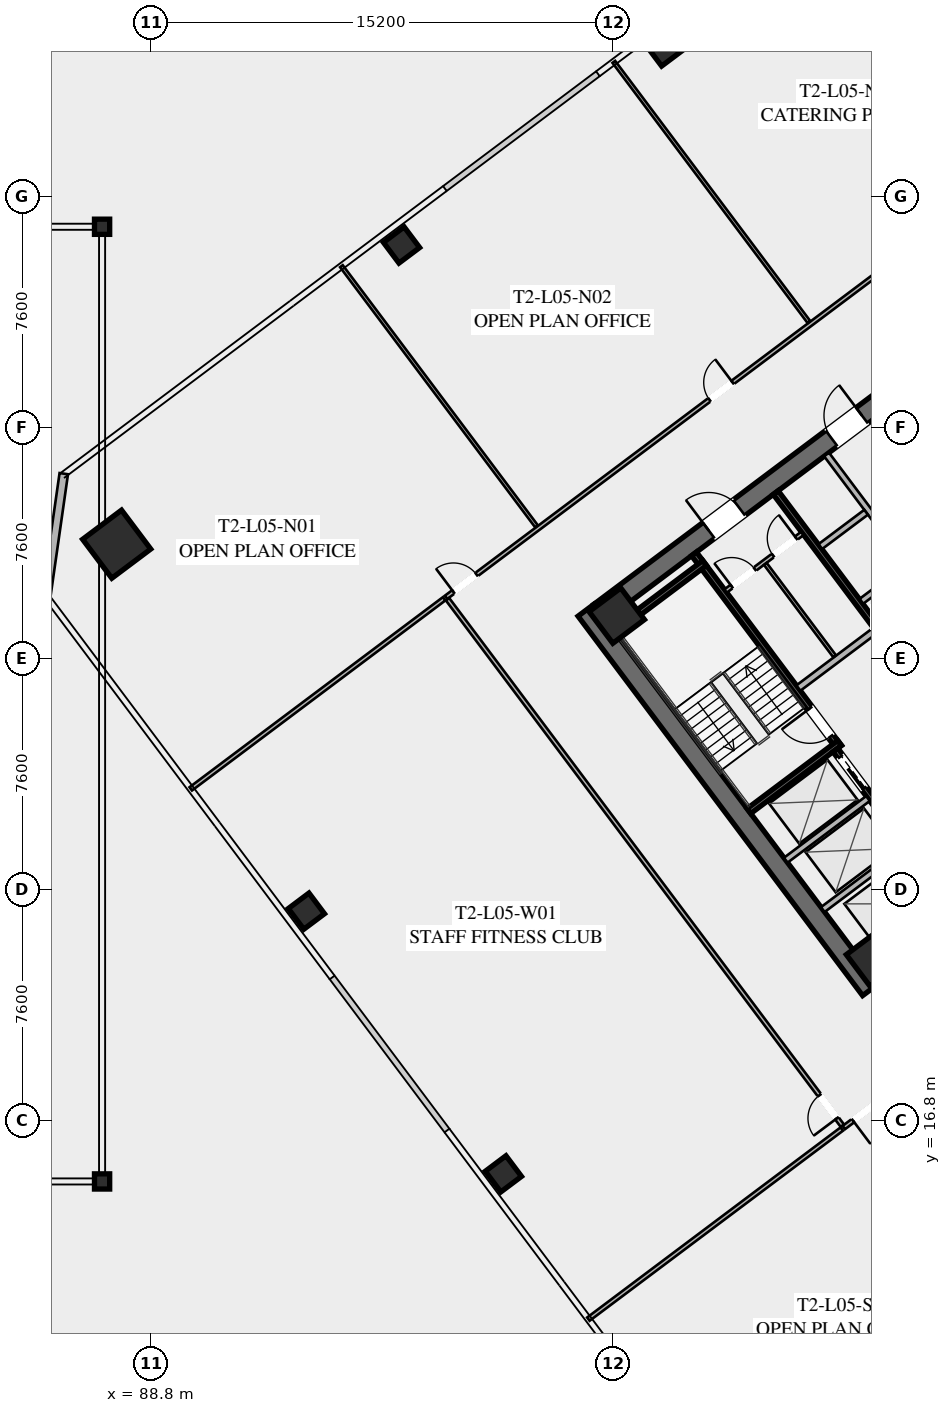
"""IFC4 building model, lengths in metres.
Left out: names, types, materials, properties, quantities, classifications, styles, units other than length and angle.
Written with IfcOpenShell. Run it as: python <this file> out.ifc"""

import sys

from ifc_helpers import new_model, si_unit, direction, frame, frame_2d, origin, origin_2d, place, context, subcontext, project, spatial, rectangle, hollow_rectangle, extrude, element, fill, save


model = new_model("IFC4")
c1 = context("Model", 3, precision=1e-05, world=origin(), true_north=direction((0.0, 1.0)))
c2 = subcontext(c1, "Body", "Model", "MODEL_VIEW")
j1 = project(units=[si_unit("LENGTHUNIT", "METRE"), si_unit("PLANEANGLEUNIT", "RADIAN")], contexts=[c1])
p1 = place(None, origin())
s1 = spatial("IfcSite", under=j1, at=p1, CompositionType="ELEMENT")
p2 = place(p1, origin())
s2 = spatial("IfcBuilding", under=s1, at=p2, CompositionType="ELEMENT")
p3 = place(p2, frame((0.0, 0.0, 24.6)))
s3 = spatial("IfcBuildingStorey", under=s2, at=p3, CompositionType="ELEMENT", Elevation=24.6)
for number, where, z_axis, x_axis in (
    (1, (87.2, 14.8, 0.0), (0.0, 0.0, 1.0), (1.0, 0.0, 0.0)),
    (2, (87.2, 46.2, 0.0), (0.0, 0.0, 1.0), (1.0, 0.0, 0.0)),
):
    element("IfcColumn", number, at=place(p3, frame(where, z_axis=z_axis, x_axis=x_axis)), inside=s3, PredefinedType="COLUMN", context=c2, shape_type="SweptSolid", body=[
        extrude(hollow_rectangle(XDim=0.5, YDim=0.5, WallThickness=0.02, at=origin_2d()), origin(), (0.0, 0.0, 1.0), 5.2),
    ])
p4 = place(p3, frame((112.476, 21.107, 0.0), z_axis=(0.0, 0.0, 1.0), x_axis=(-0.600005007985, 0.799996243986, 0.0)))
e3 = element("IfcWall", 3, at=p4, inside=s3, PredefinedType="SHEAR", context=c2, shape_type="SweptSolid", body=[
    extrude(rectangle(XDim=15.6, YDim=0.65, at=frame_2d((7.8, 0.0))), origin(), (0.0, 0.0, 1.0), 3.55),
])
p5 = place(p3, frame((124.429, 30.478, 0.0), z_axis=(0.0, 0.0, 1.0), x_axis=(-0.799998028465, -0.600002628705, 0.0)))
e4 = element("IfcWall", 4, at=p5, inside=s3, PredefinedType="SHEAR", context=c2, shape_type="SweptSolid", body=[
    extrude(rectangle(XDim=14.86, YDim=0.65, at=frame_2d((7.43, 0.0))), origin(), (0.0, 0.0, 1.0), 3.55),
])
p6 = place(p5, frame((9.13, 0.0, 0.0)))
e5 = element("IfcOpeningElement", 5, at=p6, cuts=e4, PredefinedType="OPENING", context=c2, shape_type="SweptSolid", body=[
    extrude(rectangle(XDim=1.25, YDim=2.25, at=frame_2d((0.625, 1.125))), frame((0.0, 0.335, 0.0), z_axis=(0.0, -1.0, 0.0), x_axis=(1.0, 0.0, 0.0)), (0.0, 0.0, 1.0), 0.67),
])
p7 = place(p5, frame((4.08, 0.0, 0.0)))
e6 = element("IfcOpeningElement", 6, at=p7, cuts=e4, PredefinedType="OPENING", context=c2, shape_type="SweptSolid", body=[
    extrude(rectangle(XDim=1.25, YDim=2.25, at=frame_2d((0.625, 1.125))), frame((0.0, 0.335, 0.0), z_axis=(0.0, -1.0, 0.0), x_axis=(1.0, 0.0, 0.0)), (0.0, 0.0, 1.0), 0.67),
])
p8 = place(p3, frame((103.571, 33.522, 0.0), z_axis=(0.0, 0.0, 1.0), x_axis=(0.799998028465, 0.600002628705, 0.0)))
e7 = element("IfcWall", 7, at=p8, inside=s3, PredefinedType="SHEAR", context=c2, shape_type="SweptSolid", body=[
    extrude(rectangle(XDim=14.86, YDim=0.65, at=frame_2d((7.43, 0.0))), origin(), (0.0, 0.0, 1.0), 3.55),
])
p9 = place(p8, frame((4.48, 0.0, 0.0)))
e8 = element("IfcOpeningElement", 8, at=p9, cuts=e7, PredefinedType="OPENING", context=c2, shape_type="SweptSolid", body=[
    extrude(rectangle(XDim=1.25, YDim=2.25, at=frame_2d((0.625, 1.125))), frame((0.0, 0.335, 0.0), z_axis=(0.0, -1.0, 0.0), x_axis=(1.0, 0.0, 0.0)), (0.0, 0.0, 1.0), 0.67),
])
p10 = place(p8, frame((9.53, 0.0, 0.0)))
e9 = element("IfcOpeningElement", 9, at=p10, cuts=e7, PredefinedType="OPENING", context=c2, shape_type="SweptSolid", body=[
    extrude(rectangle(XDim=1.25, YDim=2.25, at=frame_2d((0.625, 1.125))), frame((0.0, 0.335, 0.0), z_axis=(0.0, -1.0, 0.0), x_axis=(1.0, 0.0, 0.0)), (0.0, 0.0, 1.0), 0.67),
])
for number, where, z_axis, x_axis in (
    (10, (112.59, 22.13, 0.0), (0.0, 0.0, 1.0), (0.8, 0.6, 0.0)),
    (11, (104.13, 33.41, 0.0), (0.0, 0.0, 1.0), (0.8, 0.6, 0.0)),
):
    element("IfcColumn", number, at=place(p3, frame(where, z_axis=z_axis, x_axis=x_axis)), inside=s3, PredefinedType="COLUMN", context=c2, shape_type="SweptSolid", body=[
        extrude(hollow_rectangle(XDim=1.3, YDim=1.3, WallThickness=0.05, at=origin_2d()), origin(), (0.0, 0.0, 1.0), 3.35),
    ])
p11 = place(p3, frame((87.68, 35.76, 0.0), z_axis=(0.0, 0.0, 1.0), x_axis=(0.799999996291, 0.600000004945, 0.0)))
e12 = element("IfcColumn", 12, at=p11, inside=s3, PredefinedType="COLUMN", context=c2, shape_type="SweptSolid", body=[
    extrude(hollow_rectangle(XDim=1.6, YDim=1.6, WallThickness=0.06, at=origin_2d()), origin(), (0.0, 0.0, 1.0), 3.35),
])
for number, where, z_axis, x_axis in (
    (13, (105.69, 52.08, 0.0), (0.0, 0.0, 1.0), (0.8, 0.6, 0.0)),
    (14, (97.05, 45.6, 0.0), (0.0, 0.0, 1.0), (0.8, 0.6, 0.0)),
    (15, (93.92, 23.69, 0.0), (0.0, 0.0, 1.0), (0.8, 0.6, 0.0)),
    (16, (100.4, 15.05, 0.0), (0.0, 0.0, 1.0), (0.8, 0.6, 0.0)),
):
    element("IfcColumn", number, at=place(p3, frame(where, z_axis=z_axis, x_axis=x_axis)), inside=s3, PredefinedType="COLUMN", context=c2, shape_type="SweptSolid", body=[
        extrude(hollow_rectangle(XDim=0.85, YDim=0.85, WallThickness=0.035, at=origin_2d()), origin(), (0.0, 0.0, 1.0), 3.35),
    ])
p12 = place(p3, frame((85.36, 34.02, 0.0), z_axis=(0.0, 0.0, 1.0), x_axis=(0.14137968631, 0.989955445613, 0.0)))
e17 = element("IfcWall", 17, at=p12, inside=s3, PredefinedType="SOLIDWALL", context=c2, shape_type="SweptSolid", body=[
    extrude(rectangle(XDim=4.101, YDim=0.28, at=frame_2d((2.051, 0.0))), origin(), (0.0, 0.0, 1.0), 3.35),
])
p13 = place(p3, frame((111.44, 29.08, 0.0), z_axis=(0.0, 0.0, 1.0), x_axis=(-0.600009827119, 0.799992629566, 0.0)))
e18 = element("IfcWall", 18, at=p13, inside=s3, PredefinedType="SHEAR", context=c2, shape_type="SweptSolid", body=[
    extrude(rectangle(XDim=7.95, YDim=0.2, at=frame_2d((3.975, 0.0))), origin(), (0.0, 0.0, 1.0), 3.35),
])
p14 = place(p13, frame((0.45, 0.0, 0.0)))
e19 = element("IfcOpeningElement", 19, at=p14, cuts=e18, PredefinedType="OPENING", context=c2, shape_type="SweptSolid", body=[
    extrude(rectangle(XDim=1.15, YDim=2.2, at=frame_2d((0.575, 1.1))), frame((0.0, 0.11, 0.0), z_axis=(0.0, -1.0, 0.0), x_axis=(1.0, 0.0, 0.0)), (0.0, 0.0, 1.0), 0.22),
])
for number, where, z_axis, x_axis in (
    (20, (108.476, 26.982, 0.0), (0.0, 0.0, 1.0), (0.8, 0.6, 0.0)),
    (21, (104.036, 32.902, 0.0), (0.0, 0.0, 1.0), (0.8, 0.6, 0.0)),
):
    element("IfcWall", number, at=place(p3, frame(where, z_axis=z_axis, x_axis=x_axis)), inside=s3, PredefinedType="SHEAR", context=c2, shape_type="SweptSolid", body=[
        extrude(rectangle(XDim=3.73, YDim=0.2, at=frame_2d((1.865, 0.0))), origin(), (0.0, 0.0, 1.0), 3.35),
    ])
p15 = place(p3, frame((117.938, 26.016, 0.0), z_axis=(0.0, 0.0, 1.0), x_axis=(-0.600005463273, 0.799995902516, 0.0)))
e22 = element("IfcWall", 22, at=p15, inside=s3, PredefinedType="SHEAR", context=c2, shape_type="SweptSolid", body=[
    extrude(rectangle(XDim=14.3, YDim=0.2, at=frame_2d((7.15, 0.0))), origin(), (0.0, 0.0, 1.0), 3.35),
])
p16 = place(p3, frame((110.104, 31.028, 0.0), z_axis=(0.0, 0.0, 1.0), x_axis=(0.800018601094, 0.59997519774, 0.0)))
e23 = element("IfcWall", 23, at=p16, inside=s3, PredefinedType="SOLIDWALL", context=c2, shape_type="SweptSolid", body=[
    extrude(rectangle(XDim=3.15, YDim=0.22, at=frame_2d((1.575, 0.0))), origin(), (0.0, 0.0, 1.0), 2.703),
])
p17 = place(p3, frame((115.13, 23.91, 0.0), z_axis=(0.0, 0.0, 1.0), x_axis=(-0.599975393228, 0.800018454488, 0.0)))
e24 = element("IfcWall", 24, at=p17, inside=s3, PredefinedType="SHEAR", context=c2, shape_type="SweptSolid", body=[
    extrude(rectangle(XDim=6.35, YDim=0.2, at=frame_2d((3.175, 0.0))), origin(), (0.0, 0.0, 1.0), 3.35),
])
p18 = place(p17, frame((4.775, 0.0, 0.0)))
e25 = element("IfcOpeningElement", 25, at=p18, cuts=e24, PredefinedType="OPENING", context=c2, shape_type="SweptSolid", body=[
    extrude(rectangle(XDim=1.3, YDim=2.25, at=frame_2d((0.65, 1.125))), frame((0.0, 0.11, 0.0), z_axis=(0.0, -1.0, 0.0), x_axis=(1.0, 0.0, 0.0)), (0.0, 0.0, 1.0), 0.22),
])
p19 = place(p17, frame((2.775, 0.0, 0.0)))
e26 = element("IfcOpeningElement", 26, at=p19, cuts=e24, PredefinedType="OPENING", context=c2, shape_type="SweptSolid", body=[
    extrude(rectangle(XDim=1.3, YDim=2.25, at=frame_2d((0.65, 1.125))), frame((0.0, 0.11, 0.0), z_axis=(0.0, -1.0, 0.0), x_axis=(1.0, 0.0, 0.0)), (0.0, 0.0, 1.0), 0.22),
])
p20 = place(p17, frame((0.575, 0.0, 0.0)))
e27 = element("IfcOpeningElement", 27, at=p20, cuts=e24, PredefinedType="OPENING", context=c2, shape_type="SweptSolid", body=[
    extrude(rectangle(XDim=1.3, YDim=2.25, at=frame_2d((0.65, 1.125))), frame((0.0, 0.11, 0.0), z_axis=(0.0, -1.0, 0.0), x_axis=(1.0, 0.0, 0.0)), (0.0, 0.0, 1.0), 0.22),
])
for number, where, z_axis, x_axis in (
    (28, (110.906, 23.742, 0.0), (0.0, 0.0, 1.0), (0.8, 0.6, 0.0)),
    (29, (109.688, 25.366, 0.0), (0.0, 0.0, 1.0), (0.8, 0.6, 0.0)),
):
    element("IfcWall", number, at=place(p3, frame(where, z_axis=z_axis, x_axis=x_axis)), inside=s3, PredefinedType="SOLIDWALL", context=c2, shape_type="SweptSolid", body=[
        extrude(rectangle(XDim=3.38, YDim=0.2, at=frame_2d((1.69, 0.0))), origin(), (0.0, 0.0, 1.0), 3.35),
    ])
p21 = place(p3, frame((107.71, 34.22, 0.0), z_axis=(0.0, 0.0, 1.0), x_axis=(0.799981399002, 0.60002480053, 0.0)))
e30 = element("IfcWall", 30, at=p21, inside=s3, PredefinedType="PARTITIONING", context=c2, shape_type="SweptSolid", body=[
    extrude(rectangle(XDim=3.15, YDim=0.135, at=frame_2d((1.575, 0.0))), origin(), (0.0, 0.0, 1.0), 2.703),
])
p22 = place(p21, frame((0.25, 0.0, 0.0)))
e31 = element("IfcOpeningElement", 31, at=p22, cuts=e30, PredefinedType="OPENING", context=c2, shape_type="SweptSolid", body=[
    extrude(rectangle(XDim=0.95, YDim=2.05, at=frame_2d((0.475, 1.025))), frame((0.0, 0.077, 0.0), z_axis=(0.0, -1.0, 0.0), x_axis=(1.0, 0.0, 0.0)), (0.0, 0.0, 1.0), 0.155),
])
p23 = place(p21, frame((1.95, 0.0, 0.0)))
e32 = element("IfcOpeningElement", 32, at=p23, cuts=e30, PredefinedType="OPENING", context=c2, shape_type="SweptSolid", body=[
    extrude(rectangle(XDim=0.95, YDim=2.05, at=frame_2d((0.475, 1.025))), frame((0.0, 0.077, 0.0), z_axis=(0.0, -1.0, 0.0), x_axis=(1.0, 0.0, 0.0)), (0.0, 0.0, 1.0), 0.155),
])
p24 = place(p3, frame((111.296, 32.072, 0.0), z_axis=(0.0, 0.0, 1.0), x_axis=(-0.59995887973, 0.800030838552, 0.0)))
e33 = element("IfcWall", 33, at=p24, inside=s3, PredefinedType="PARTITIONING", context=c2, shape_type="SweptSolid", body=[
    extrude(rectangle(XDim=3.8, YDim=0.11, at=frame_2d((1.9, 0.0))), origin(), (0.0, 0.0, 1.0), 2.703),
])
p25 = place(p3, frame((115.11, 33.27, 0.0), z_axis=(0.0, 0.0, 1.0), x_axis=(-0.600011488909, 0.79999138319, 0.0)))
e34 = element("IfcWall", 34, at=p25, inside=s3, PredefinedType="SOLIDWALL", context=c2, shape_type="SweptSolid", body=[
    extrude(rectangle(XDim=6.8, YDim=0.2, at=frame_2d((3.4, 0.0))), origin(), (0.0, 0.0, 1.0), 3.35),
])
p26 = place(p3, frame((112.176, 33.882, 0.0), z_axis=(0.0, 0.0, 1.0), x_axis=(0.8, 0.6, 0.0)))
e35 = element("IfcWall", 35, at=p26, inside=s3, PredefinedType="SOLIDWALL", context=c2, shape_type="SweptSolid", body=[
    extrude(rectangle(XDim=1.88, YDim=0.2, at=frame_2d((0.94, 0.0))), origin(), (0.0, 0.0, 1.0), 3.35),
])
p27 = place(p3, frame((110.826, 35.682, 0.0), z_axis=(0.0, 0.0, 1.0), x_axis=(0.799984418148, 0.600020775241, 0.0)))
e36 = element("IfcWall", 36, at=p27, inside=s3, PredefinedType="SOLIDWALL", context=c2, shape_type="SweptSolid", body=[
    extrude(rectangle(XDim=1.88, YDim=0.2, at=frame_2d((0.94, 0.0))), origin(), (0.0, 0.0, 1.0), 3.35),
])
p28 = place(p3, frame((98.516, 34.012, 0.0), z_axis=(0.0, 0.0, 1.0), x_axis=(0.799998035726, 0.600002619023, 0.0)))
e37 = element("IfcWall", 37, at=p28, inside=s3, PredefinedType="PARTITIONING", context=c2, shape_type="SweptSolid", body=[
    extrude(rectangle(XDim=29.83, YDim=0.135, at=frame_2d((14.915, 0.0))), origin(), (0.0, 0.0, 1.0), 2.703),
])
p29 = place(p28, frame((0.3, 0.0, 0.0)))
e38 = element("IfcOpeningElement", 38, at=p29, cuts=e37, PredefinedType="OPENING", context=c2, shape_type="SweptSolid", body=[
    extrude(rectangle(XDim=0.95, YDim=2.05, at=frame_2d((0.475, 1.025))), frame((0.0, 0.077, 0.0), z_axis=(0.0, -1.0, 0.0), x_axis=(1.0, 0.0, 0.0)), (0.0, 0.0, 1.0), 0.155),
])
p30 = place(p28, frame((10.829, 0.0, 0.0)))
e39 = element("IfcOpeningElement", 39, at=p30, cuts=e37, PredefinedType="OPENING", context=c2, shape_type="SweptSolid", body=[
    extrude(rectangle(XDim=0.95, YDim=2.05, at=frame_2d((0.475, 1.025))), frame((0.0, 0.077, 0.0), z_axis=(0.0, -1.0, 0.0), x_axis=(1.0, 0.0, 0.0)), (0.0, 0.0, 1.0), 0.155),
])
p31 = place(p28, frame((28.58, 0.0, 0.0)))
e40 = element("IfcOpeningElement", 40, at=p31, cuts=e37, PredefinedType="OPENING", context=c2, shape_type="SweptSolid", body=[
    extrude(rectangle(XDim=0.95, YDim=2.05, at=frame_2d((0.475, 1.025))), frame((0.0, 0.077, 0.0), z_axis=(0.0, -1.0, 0.0), x_axis=(1.0, 0.0, 0.0)), (0.0, 0.0, 1.0), 0.155),
])
for number, where, z_axis, x_axis in (
    (41, (101.492, 36.344, 0.0), (0.0, 0.0, 1.0), (-0.6, 0.8, 0.0)),
    (42, (110.452, 43.064, 0.0), (0.0, 0.0, 1.0), (-0.6, 0.8, 0.0)),
):
    element("IfcWall", number, at=place(p3, frame(where, z_axis=z_axis, x_axis=x_axis)), inside=s3, PredefinedType="PARTITIONING", context=c2, shape_type="SweptSolid", body=[
        extrude(rectangle(XDim=10.7, YDim=0.11, at=frame_2d((5.35, 0.0))), origin(), (0.0, 0.0, 1.0), 2.703),
    ])
p32 = place(p3, frame((135.46, 34.47, 0.0), z_axis=(0.0, 0.0, 1.0), x_axis=(-0.800000982127, -0.599998690494, 0.0)))
e43 = element("IfcWall", 43, at=p32, inside=s3, PredefinedType="PARTITIONING", context=c2, shape_type="SweptSolid", body=[
    extrude(rectangle(XDim=29.83, YDim=0.135, at=frame_2d((14.915, 0.0))), origin(), (0.0, 0.0, 1.0), 2.703),
])
p33 = place(p32, frame((28.5, 0.0, 0.0)))
e44 = element("IfcOpeningElement", 44, at=p33, cuts=e43, PredefinedType="OPENING", context=c2, shape_type="SweptSolid", body=[
    extrude(rectangle(XDim=0.95, YDim=2.05, at=frame_2d((0.475, 1.025))), frame((0.0, 0.077, 0.0), z_axis=(0.0, -1.0, 0.0), x_axis=(1.0, 0.0, 0.0)), (0.0, 0.0, 1.0), 0.155),
])
p34 = place(p32, frame((18.075, 0.0, 0.0)))
e45 = element("IfcOpeningElement", 45, at=p34, cuts=e43, PredefinedType="OPENING", context=c2, shape_type="SweptSolid", body=[
    extrude(rectangle(XDim=0.95, YDim=2.05, at=frame_2d((0.475, 1.025))), frame((0.0, 0.077, 0.0), z_axis=(0.0, -1.0, 0.0), x_axis=(1.0, 0.0, 0.0)), (0.0, 0.0, 1.0), 0.155),
])
p35 = place(p32, frame((0.38, 0.0, 0.0)))
e46 = element("IfcOpeningElement", 46, at=p35, cuts=e43, PredefinedType="OPENING", context=c2, shape_type="SweptSolid", body=[
    extrude(rectangle(XDim=0.95, YDim=2.05, at=frame_2d((0.475, 1.025))), frame((0.0, 0.077, 0.0), z_axis=(0.0, -1.0, 0.0), x_axis=(1.0, 0.0, 0.0)), (0.0, 0.0, 1.0), 0.155),
])
p36 = place(p3, frame((111.548, 16.636, 0.0), z_axis=(0.0, 0.0, 1.0), x_axis=(-0.600003610192, 0.799997292343, 0.0)))
e47 = element("IfcWall", 47, at=p36, inside=s3, PredefinedType="PARTITIONING", context=c2, shape_type="SweptSolid", body=[
    extrude(rectangle(XDim=21.64, YDim=0.135, at=frame_2d((10.82, 0.0))), origin(), (0.0, 0.0, 1.0), 2.703),
])
p37 = place(p36, frame((0.3, 0.0, 0.0)))
e48 = element("IfcOpeningElement", 48, at=p37, cuts=e47, PredefinedType="OPENING", context=c2, shape_type="SweptSolid", body=[
    extrude(rectangle(XDim=0.95, YDim=2.05, at=frame_2d((0.475, 1.025))), frame((0.0, 0.077, 0.0), z_axis=(0.0, -1.0, 0.0), x_axis=(1.0, 0.0, 0.0)), (0.0, 0.0, 1.0), 0.155),
])
p38 = place(p3, frame((98.452, 33.964, 0.0), z_axis=(0.0, 0.0, 1.0), x_axis=(-0.799988753532, -0.600014994998, 0.0)))
e49 = element("IfcWall", 49, at=p38, inside=s3, PredefinedType="PARTITIONING", context=c2, shape_type="SweptSolid", body=[
    extrude(rectangle(XDim=10.42, YDim=0.135, at=frame_2d((5.21, 0.0))), origin(), (0.0, 0.0, 1.0), 2.703),
])
p39 = place(p3, frame((103.196, 10.272, 0.0), z_axis=(0.0, 0.0, 1.0), x_axis=(0.8, 0.6, 0.0)))
e50 = element("IfcWall", 50, at=p39, inside=s3, PredefinedType="PARTITIONING", context=c2, shape_type="SweptSolid", body=[
    extrude(rectangle(XDim=10.42, YDim=0.135, at=frame_2d((5.21, 0.0))), origin(), (0.0, 0.0, 1.0), 2.703),
])
p40 = place(p9, origin())
e51 = element("IfcDoor", 51, at=p40, inside=s3, OperationType="SINGLE_SWING_LEFT", PredefinedType="DOOR", context=c2, shape_type="SweptSolid", body=[
    extrude(rectangle(XDim=1.25, YDim=2.25, at=frame_2d((0.625, 1.125))), frame((0.0, 0.025, 0.0), z_axis=(0.0, -1.0, 0.0), x_axis=(1.0, 0.0, 0.0)), (0.0, 0.0, 1.0), 0.05),
])
fill(e8, e51)
p41 = place(p10, origin())
e52 = element("IfcDoor", 52, at=p41, inside=s3, OperationType="SINGLE_SWING_RIGHT", PredefinedType="DOOR", context=c2, shape_type="SweptSolid", body=[
    extrude(rectangle(XDim=1.25, YDim=2.25, at=frame_2d((0.625, 1.125))), frame((0.0, 0.025, 0.0), z_axis=(0.0, -1.0, 0.0), x_axis=(1.0, 0.0, 0.0)), (0.0, 0.0, 1.0), 0.05),
])
fill(e9, e52)
p42 = place(p14, origin())
e53 = element("IfcDoor", 53, at=p42, inside=s3, OperationType="SINGLE_SWING_RIGHT", PredefinedType="DOOR", context=c2, shape_type="SweptSolid", body=[
    extrude(rectangle(XDim=1.15, YDim=2.2, at=frame_2d((0.575, 1.1))), frame((0.0, 0.025, 0.0), z_axis=(0.0, -1.0, 0.0), x_axis=(1.0, 0.0, 0.0)), (0.0, 0.0, 1.0), 0.05),
])
fill(e19, e53)
p43 = place(p22, origin())
e54 = element("IfcDoor", 54, at=p43, inside=s3, OperationType="SINGLE_SWING_LEFT", PredefinedType="DOOR", context=c2, shape_type="SweptSolid", body=[
    extrude(rectangle(XDim=0.95, YDim=2.05, at=frame_2d((0.475, 1.025))), frame((0.0, 0.025, 0.0), z_axis=(0.0, -1.0, 0.0), x_axis=(1.0, 0.0, 0.0)), (0.0, 0.0, 1.0), 0.05),
])
fill(e31, e54)
p44 = place(p23, origin())
e55 = element("IfcDoor", 55, at=p44, inside=s3, OperationType="SINGLE_SWING_RIGHT", PredefinedType="DOOR", context=c2, shape_type="SweptSolid", body=[
    extrude(rectangle(XDim=0.95, YDim=2.05, at=frame_2d((0.475, 1.025))), frame((0.0, 0.025, 0.0), z_axis=(0.0, -1.0, 0.0), x_axis=(1.0, 0.0, 0.0)), (0.0, 0.0, 1.0), 0.05),
])
fill(e32, e55)
p45 = place(p29, origin())
e56 = element("IfcDoor", 56, at=p45, inside=s3, OperationType="SINGLE_SWING_LEFT", PredefinedType="DOOR", context=c2, shape_type="SweptSolid", body=[
    extrude(rectangle(XDim=0.95, YDim=2.05, at=frame_2d((0.475, 1.025))), frame((0.0, 0.025, 0.0), z_axis=(0.0, -1.0, 0.0), x_axis=(1.0, 0.0, 0.0)), (0.0, 0.0, 1.0), 0.05),
])
fill(e38, e56)
p46 = place(p30, origin())
e57 = element("IfcDoor", 57, at=p46, inside=s3, OperationType="SINGLE_SWING_RIGHT", PredefinedType="DOOR", context=c2, shape_type="SweptSolid", body=[
    extrude(rectangle(XDim=0.95, YDim=2.05, at=frame_2d((0.475, 1.025))), frame((0.0, 0.025, 0.0), z_axis=(0.0, -1.0, 0.0), x_axis=(1.0, 0.0, 0.0)), (0.0, 0.0, 1.0), 0.05),
])
fill(e39, e57)
p47 = place(p33, origin())
e58 = element("IfcDoor", 58, at=p47, inside=s3, OperationType="SINGLE_SWING_RIGHT", PredefinedType="DOOR", context=c2, shape_type="SweptSolid", body=[
    extrude(rectangle(XDim=0.95, YDim=2.05, at=frame_2d((0.475, 1.025))), frame((0.0, 0.025, 0.0), z_axis=(0.0, -1.0, 0.0), x_axis=(1.0, 0.0, 0.0)), (0.0, 0.0, 1.0), 0.05),
])
fill(e44, e58)
p48 = place(p37, origin())
e59 = element("IfcDoor", 59, at=p48, inside=s3, OperationType="SINGLE_SWING_LEFT", PredefinedType="DOOR", context=c2, shape_type="SweptSolid", body=[
    extrude(rectangle(XDim=0.95, YDim=2.05, at=frame_2d((0.475, 1.025))), frame((0.0, 0.025, 0.0), z_axis=(0.0, -1.0, 0.0), x_axis=(1.0, 0.0, 0.0)), (0.0, 0.0, 1.0), 0.05),
])
fill(e48, e59)
p49 = place(p18, origin())
e60 = element("IfcDoor", 60, at=p49, inside=s3, OperationType="SLIDING_TO_LEFT", PredefinedType="DOOR", context=c2, shape_type="SweptSolid", body=[
    extrude(rectangle(XDim=1.3, YDim=2.25, at=frame_2d((0.65, 1.125))), frame((0.0, 0.025, 0.0), z_axis=(0.0, -1.0, 0.0), x_axis=(1.0, 0.0, 0.0)), (0.0, 0.0, 1.0), 0.05),
])
fill(e25, e60)
save(model, sys.argv[1])
